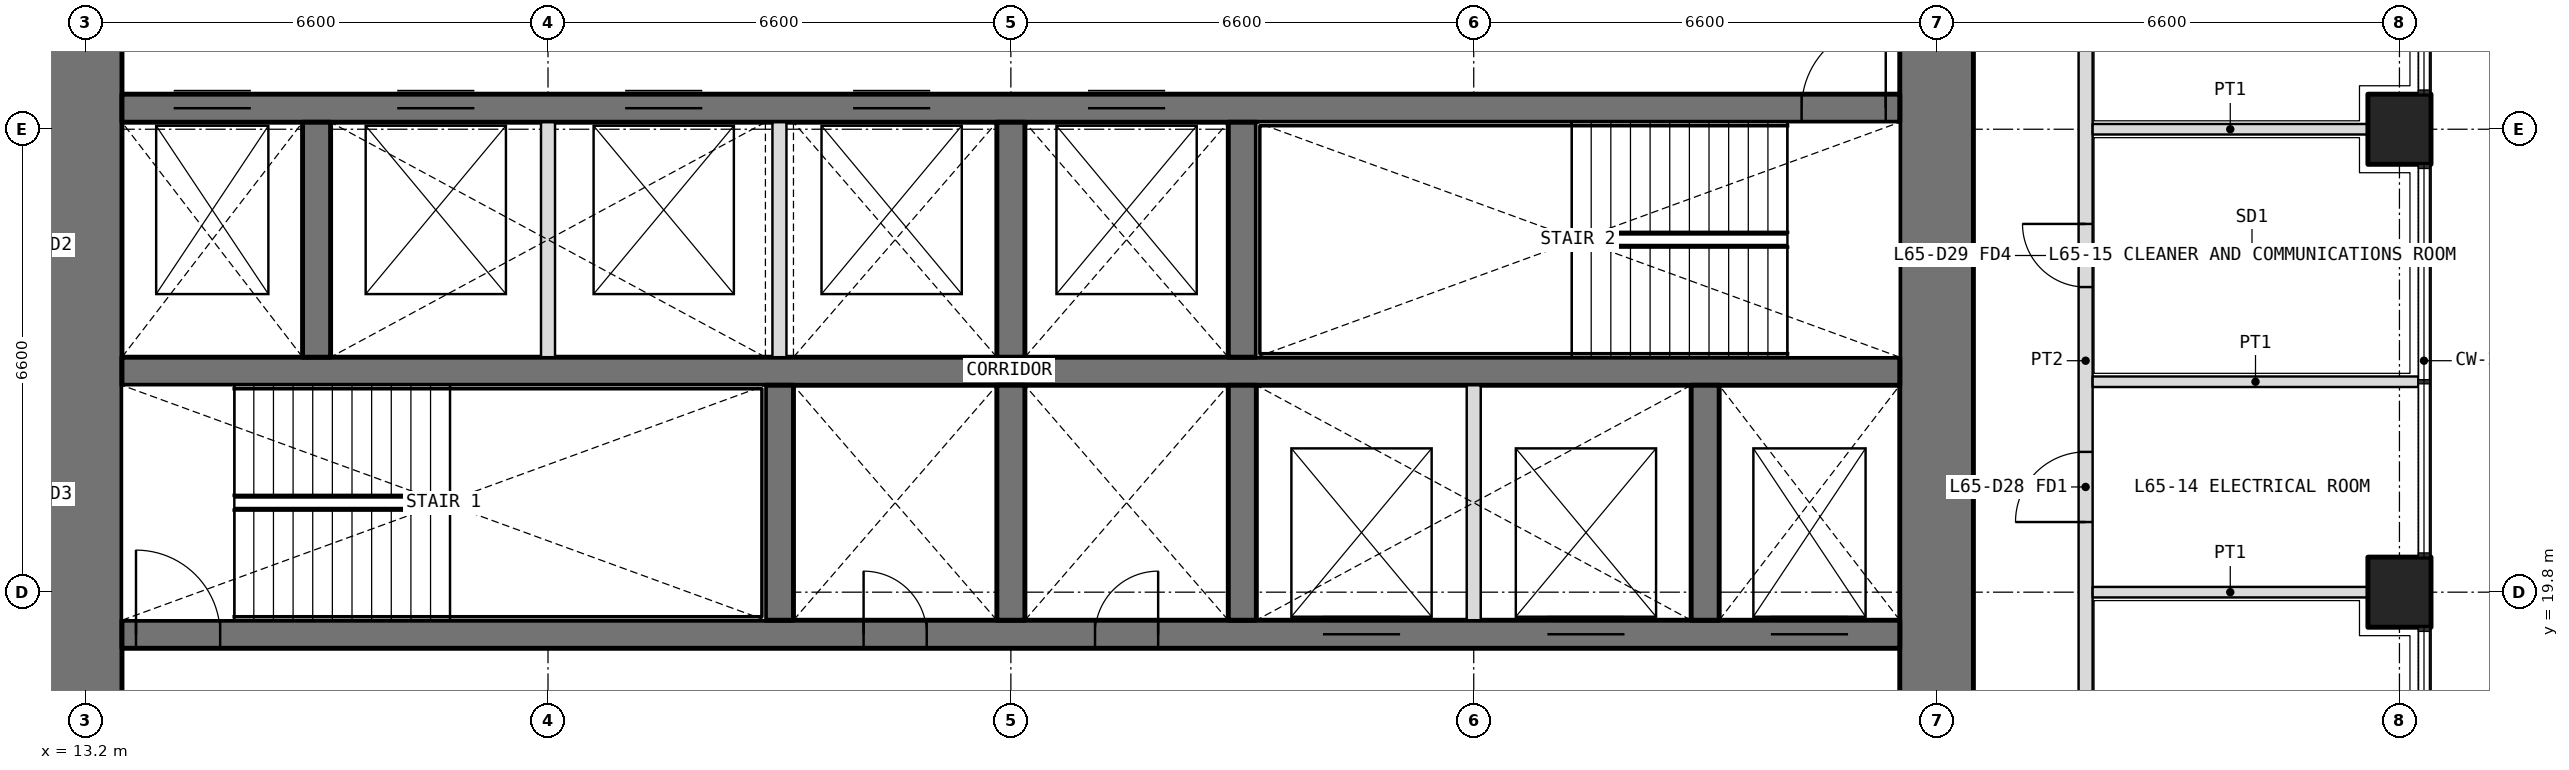
"""IFC4 building model, lengths in metres.
Left out: names, types, materials, properties, quantities, classifications, styles, units other than length and angle.
Written with IfcOpenShell. Run it as: python <this file> out.ifc"""

import sys

from ifc_helpers import new_model, si_unit, direction, frame, frame_2d, origin, origin_2d, place, context, subcontext, project, spatial, rectangle, extrude, element, fill, save


model = new_model("IFC4")
c1 = context("Model", 3, precision=1e-05, world=origin(), true_north=direction((0.0, 1.0)))
c2 = subcontext(c1, "Body", "Model", "MODEL_VIEW")
j1 = project(units=[si_unit("LENGTHUNIT", "METRE"), si_unit("PLANEANGLEUNIT", "RADIAN")], contexts=[c1])
p1 = place(None, origin())
s1 = spatial("IfcSite", under=j1, at=p1, CompositionType="ELEMENT")
p2 = place(p1, origin())
s2 = spatial("IfcBuilding", under=s1, at=p2, CompositionType="ELEMENT")
p3 = place(p2, frame((0.0, 0.0, 283.8)))
s3 = spatial("IfcBuildingStorey", under=s2, at=p3, CompositionType="ELEMENT", Elevation=283.8)
for number, where, z_axis, x_axis in (
    (1, (46.2, 19.8, 0.0), (0.0, 0.0, 1.0), (0.0, 1.0, 0.0)),
    (2, (46.2, 26.4, 0.0), (0.0, 0.0, 1.0), (0.0, 1.0, 0.0)),
):
    element("IfcColumn", number, at=place(p3, frame(where, z_axis=z_axis, x_axis=x_axis)), inside=s3, PredefinedType="COLUMN", context=c2, shape_type="SweptSolid", body=[
        extrude(rectangle(XDim=1.0, YDim=0.9, at=origin_2d()), origin(), (0.0, 0.0, 1.0), 4.2),
    ])
p4 = place(p3, frame((39.6, 13.725, 0.0), z_axis=(0.0, 0.0, 1.0), x_axis=(0.0, 1.0, 0.0)))
e3 = element("IfcWall", 3, at=p4, inside=s3, PredefinedType="SHEAR", context=c2, shape_type="SweptSolid", body=[
    extrude(rectangle(XDim=18.75, YDim=1.05, at=frame_2d((9.375, 0.0))), origin(), (0.0, 0.0, 1.0), 4.2),
])
p5 = place(p4, frame((3.025, 0.0, 0.0)))
e4 = element("IfcOpeningElement", 4, at=p5, cuts=e3, PredefinedType="OPENING", context=c2, shape_type="SweptSolid", body=[
    extrude(rectangle(XDim=1.6, YDim=2.1, at=frame_2d((0.8, 1.05))), frame((0.0, 0.535, 0.0), z_axis=(0.0, -1.0, 0.0), x_axis=(1.0, 0.0, 0.0)), (0.0, 0.0, 1.0), 1.07),
])
p6 = place(p4, frame((13.825, 0.0, 0.0)))
e5 = element("IfcOpeningElement", 5, at=p6, cuts=e3, PredefinedType="OPENING", context=c2, shape_type="SweptSolid", body=[
    extrude(rectangle(XDim=1.6, YDim=2.1, at=frame_2d((0.8, 1.05))), frame((0.0, 0.535, 0.0), z_axis=(0.0, -1.0, 0.0), x_axis=(1.0, 0.0, 0.0)), (0.0, 0.0, 1.0), 1.07),
])
p7 = place(p3, frame((13.2, 32.475, 0.0), z_axis=(0.0, 0.0, 1.0), x_axis=(0.0, -1.0, 0.0)))
e6 = element("IfcWall", 6, at=p7, inside=s3, PredefinedType="SHEAR", context=c2, shape_type="SweptSolid", body=[
    extrude(rectangle(XDim=18.75, YDim=1.05, at=frame_2d((9.375, 0.0))), origin(), (0.0, 0.0, 1.0), 4.2),
])
p8 = place(p7, frame((14.125, 0.0, 0.0)))
e7 = element("IfcOpeningElement", 7, at=p8, cuts=e6, PredefinedType="OPENING", context=c2, shape_type="SweptSolid", body=[
    extrude(rectangle(XDim=1.6, YDim=2.1, at=frame_2d((0.8, 1.05))), frame((0.0, 0.535, 0.0), z_axis=(0.0, -1.0, 0.0), x_axis=(1.0, 0.0, 0.0)), (0.0, 0.0, 1.0), 1.07),
])
p9 = place(p7, frame((3.325, 0.0, 0.0)))
e8 = element("IfcOpeningElement", 8, at=p9, cuts=e6, PredefinedType="OPENING", context=c2, shape_type="SweptSolid", body=[
    extrude(rectangle(XDim=1.6, YDim=2.1, at=frame_2d((0.8, 1.05))), frame((0.0, 0.535, 0.0), z_axis=(0.0, -1.0, 0.0), x_axis=(1.0, 0.0, 0.0)), (0.0, 0.0, 1.0), 1.07),
])
p10 = place(p3, frame((13.725, 19.2, 0.0), z_axis=(0.0, 0.0, 1.0), x_axis=(1.0, 0.0, 0.0)))
e9 = element("IfcWall", 9, at=p10, inside=s3, PredefinedType="SHEAR", context=c2, shape_type="SweptSolid", body=[
    extrude(rectangle(XDim=25.35, YDim=0.4, at=frame_2d((12.675, 0.0))), origin(), (0.0, 0.0, 1.0), 4.2),
])
p11 = place(p10, frame((10.575, 0.0, 0.0)))
e10 = element("IfcOpeningElement", 10, at=p11, cuts=e9, PredefinedType="OPENING", context=c2, shape_type="SweptSolid", body=[
    extrude(rectangle(XDim=0.9, YDim=2.1, at=frame_2d((0.45, 1.05))), frame((0.0, 0.21, 0.0), z_axis=(0.0, -1.0, 0.0), x_axis=(1.0, 0.0, 0.0)), (0.0, 0.0, 1.0), 0.42),
])
p12 = place(p10, frame((13.875, 0.0, 0.0)))
e11 = element("IfcOpeningElement", 11, at=p12, cuts=e9, PredefinedType="OPENING", context=c2, shape_type="SweptSolid", body=[
    extrude(rectangle(XDim=0.9, YDim=2.1, at=frame_2d((0.45, 1.05))), frame((0.0, 0.21, 0.0), z_axis=(0.0, -1.0, 0.0), x_axis=(1.0, 0.0, 0.0)), (0.0, 0.0, 1.0), 0.42),
])
p13 = place(p10, frame((0.2, 0.0, 0.0)))
e12 = element("IfcOpeningElement", 12, at=p13, cuts=e9, PredefinedType="OPENING", context=c2, shape_type="SweptSolid", body=[
    extrude(rectangle(XDim=1.2, YDim=2.1, at=frame_2d((0.6, 1.05))), frame((0.0, 0.21, 0.0), z_axis=(0.0, -1.0, 0.0), x_axis=(1.0, 0.0, 0.0)), (0.0, 0.0, 1.0), 0.42),
])
p14 = place(p10, frame((23.512, 0.0, 0.0)))
e13 = element("IfcOpeningElement", 13, at=p14, cuts=e9, PredefinedType="OPENING", context=c2, shape_type="SweptSolid", body=[
    extrude(rectangle(XDim=1.1, YDim=2.1, at=frame_2d((0.55, 1.05))), frame((0.0, 0.21, 0.0), z_axis=(0.0, -1.0, 0.0), x_axis=(1.0, 0.0, 0.0)), (0.0, 0.0, 1.0), 0.42),
])
p15 = place(p10, frame((17.125, 0.0, 0.0)))
e14 = element("IfcOpeningElement", 14, at=p15, cuts=e9, PredefinedType="OPENING", context=c2, shape_type="SweptSolid", body=[
    extrude(rectangle(XDim=1.1, YDim=2.1, at=frame_2d((0.55, 1.05))), frame((0.0, 0.21, 0.0), z_axis=(0.0, -1.0, 0.0), x_axis=(1.0, 0.0, 0.0)), (0.0, 0.0, 1.0), 0.42),
])
p16 = place(p10, frame((20.325, 0.0, 0.0)))
e15 = element("IfcOpeningElement", 15, at=p16, cuts=e9, PredefinedType="OPENING", context=c2, shape_type="SweptSolid", body=[
    extrude(rectangle(XDim=1.1, YDim=2.1, at=frame_2d((0.55, 1.05))), frame((0.0, 0.21, 0.0), z_axis=(0.0, -1.0, 0.0), x_axis=(1.0, 0.0, 0.0)), (0.0, 0.0, 1.0), 0.42),
])
p17 = place(p3, frame((13.725, 22.95, 0.0), z_axis=(0.0, 0.0, 1.0), x_axis=(1.0, 0.0, 0.0)))
e16 = element("IfcWall", 16, at=p17, inside=s3, PredefinedType="SHEAR", context=c2, shape_type="SweptSolid", body=[
    extrude(rectangle(XDim=25.35, YDim=0.4, at=frame_2d((12.675, 0.0))), origin(), (0.0, 0.0, 1.0), 4.2),
])
p18 = place(p3, frame((13.725, 26.7, 0.0), z_axis=(0.0, 0.0, 1.0), x_axis=(1.0, 0.0, 0.0)))
e17 = element("IfcWall", 17, at=p18, inside=s3, PredefinedType="SHEAR", context=c2, shape_type="SweptSolid", body=[
    extrude(rectangle(XDim=25.35, YDim=0.4, at=frame_2d((12.675, 0.0))), origin(), (0.0, 0.0, 1.0), 4.2),
])
p19 = place(p18, frame((23.95, 0.0, 0.0)))
e18 = element("IfcOpeningElement", 18, at=p19, cuts=e17, PredefinedType="OPENING", context=c2, shape_type="SweptSolid", body=[
    extrude(rectangle(XDim=1.2, YDim=2.1, at=frame_2d((0.6, 1.05))), frame((0.0, 0.21, 0.0), z_axis=(0.0, -1.0, 0.0), x_axis=(1.0, 0.0, 0.0)), (0.0, 0.0, 1.0), 0.42),
])
p20 = place(p18, frame((0.738, 0.0, 0.0)))
e19 = element("IfcOpeningElement", 19, at=p20, cuts=e17, PredefinedType="OPENING", context=c2, shape_type="SweptSolid", body=[
    extrude(rectangle(XDim=1.1, YDim=2.1, at=frame_2d((0.55, 1.05))), frame((0.0, 0.21, 0.0), z_axis=(0.0, -1.0, 0.0), x_axis=(1.0, 0.0, 0.0)), (0.0, 0.0, 1.0), 0.42),
])
p21 = place(p18, frame((3.925, 0.0, 0.0)))
e20 = element("IfcOpeningElement", 20, at=p21, cuts=e17, PredefinedType="OPENING", context=c2, shape_type="SweptSolid", body=[
    extrude(rectangle(XDim=1.1, YDim=2.1, at=frame_2d((0.55, 1.05))), frame((0.0, 0.21, 0.0), z_axis=(0.0, -1.0, 0.0), x_axis=(1.0, 0.0, 0.0)), (0.0, 0.0, 1.0), 0.42),
])
p22 = place(p18, frame((7.175, 0.0, 0.0)))
e21 = element("IfcOpeningElement", 21, at=p22, cuts=e17, PredefinedType="OPENING", context=c2, shape_type="SweptSolid", body=[
    extrude(rectangle(XDim=1.1, YDim=2.1, at=frame_2d((0.55, 1.05))), frame((0.0, 0.21, 0.0), z_axis=(0.0, -1.0, 0.0), x_axis=(1.0, 0.0, 0.0)), (0.0, 0.0, 1.0), 0.42),
])
p23 = place(p18, frame((10.425, 0.0, 0.0)))
e22 = element("IfcOpeningElement", 22, at=p23, cuts=e17, PredefinedType="OPENING", context=c2, shape_type="SweptSolid", body=[
    extrude(rectangle(XDim=1.1, YDim=2.1, at=frame_2d((0.55, 1.05))), frame((0.0, 0.21, 0.0), z_axis=(0.0, -1.0, 0.0), x_axis=(1.0, 0.0, 0.0)), (0.0, 0.0, 1.0), 0.42),
])
p24 = place(p18, frame((13.775, 0.0, 0.0)))
e23 = element("IfcOpeningElement", 23, at=p24, cuts=e17, PredefinedType="OPENING", context=c2, shape_type="SweptSolid", body=[
    extrude(rectangle(XDim=1.1, YDim=2.1, at=frame_2d((0.55, 1.05))), frame((0.0, 0.21, 0.0), z_axis=(0.0, -1.0, 0.0), x_axis=(1.0, 0.0, 0.0)), (0.0, 0.0, 1.0), 0.42),
])
for number, where, z_axis, x_axis in (
    (24, (23.1, 19.4, 0.0), (0.0, 0.0, 1.0), (0.0, 1.0, 0.0)),
    (25, (26.4, 19.4, 0.0), (0.0, 0.0, 1.0), (0.0, 1.0, 0.0)),
    (26, (29.7, 19.4, 0.0), (0.0, 0.0, 1.0), (0.0, 1.0, 0.0)),
    (27, (36.3, 19.4, 0.0), (0.0, 0.0, 1.0), (0.0, 1.0, 0.0)),
    (28, (16.5, 23.15, 0.0), (0.0, 0.0, 1.0), (0.0, 1.0, 0.0)),
    (29, (26.4, 23.15, 0.0), (0.0, 0.0, 1.0), (0.0, 1.0, 0.0)),
    (30, (29.7, 23.15, 0.0), (0.0, 0.0, 1.0), (0.0, 1.0, 0.0)),
):
    element("IfcWall", number, at=place(p3, frame(where, z_axis=z_axis, x_axis=x_axis)), inside=s3, PredefinedType="SHEAR", context=c2, shape_type="SweptSolid", body=[
        extrude(rectangle(XDim=3.35, YDim=0.4, at=frame_2d((1.675, 0.0))), origin(), (0.0, 0.0, 1.0), 4.2),
    ])
for number, where, z_axis, x_axis in (
    (31, (33.0, 19.4, 0.0), (0.0, 0.0, 1.0), (0.0, 1.0, 0.0)),
    (32, (19.8, 23.15, 0.0), (0.0, 0.0, 1.0), (0.0, 1.0, 0.0)),
    (33, (23.1, 23.15, 0.0), (0.0, 0.0, 1.0), (0.0, 1.0, 0.0)),
):
    element("IfcWall", number, at=place(p3, frame(where, z_axis=z_axis, x_axis=x_axis)), inside=s3, PredefinedType="PARTITIONING", context=c2, shape_type="SweptSolid", body=[
        extrude(rectangle(XDim=3.35, YDim=0.2, at=frame_2d((1.675, 0.0))), origin(), (0.0, 0.0, 1.0), 4.2),
    ])
p25 = place(p3, frame((41.725, 7.4, 0.0), z_axis=(0.0, 0.0, 1.0), x_axis=(0.0, 1.0, 0.0)))
e34 = element("IfcWall", 34, at=p25, inside=s3, PredefinedType="PARTITIONING", context=c2, shape_type="SweptSolid", body=[
    extrude(rectangle(XDim=31.4, YDim=0.2, at=frame_2d((15.7, 0.0))), origin(), (0.0, 0.0, 1.0), 3.0),
])
p26 = place(p25, frame((5.65, 0.0, 0.0)))
e35 = element("IfcOpeningElement", 35, at=p26, cuts=e34, PredefinedType="OPENING", context=c2, shape_type="SweptSolid", body=[
    extrude(rectangle(XDim=1.0, YDim=2.1, at=frame_2d((0.5, 1.05))), frame((0.0, 0.11, 0.0), z_axis=(0.0, -1.0, 0.0), x_axis=(1.0, 0.0, 0.0)), (0.0, 0.0, 1.0), 0.22),
])
p27 = place(p25, frame((13.4, 0.0, 0.0)))
e36 = element("IfcOpeningElement", 36, at=p27, cuts=e34, PredefinedType="OPENING", context=c2, shape_type="SweptSolid", body=[
    extrude(rectangle(XDim=1.0, YDim=2.1, at=frame_2d((0.5, 1.05))), frame((0.0, 0.11, 0.0), z_axis=(0.0, -1.0, 0.0), x_axis=(1.0, 0.0, 0.0)), (0.0, 0.0, 1.0), 0.22),
])
p28 = place(p25, frame((16.75, 0.0, 0.0)))
e37 = element("IfcOpeningElement", 37, at=p28, cuts=e34, PredefinedType="OPENING", context=c2, shape_type="SweptSolid", body=[
    extrude(rectangle(XDim=0.9, YDim=2.1, at=frame_2d((0.45, 1.05))), frame((0.0, 0.11, 0.0), z_axis=(0.0, -1.0, 0.0), x_axis=(1.0, 0.0, 0.0)), (0.0, 0.0, 1.0), 0.22),
])
p29 = place(p25, frame((24.75, 0.0, 0.0)))
e38 = element("IfcOpeningElement", 38, at=p29, cuts=e34, PredefinedType="OPENING", context=c2, shape_type="SweptSolid", body=[
    extrude(rectangle(XDim=1.0, YDim=2.1, at=frame_2d((0.5, 1.05))), frame((0.0, 0.11, 0.0), z_axis=(0.0, -1.0, 0.0), x_axis=(1.0, 0.0, 0.0)), (0.0, 0.0, 1.0), 0.22),
])
p30 = place(p3, frame((46.47, 22.8, 0.0), z_axis=(0.0, 0.0, 1.0), x_axis=(-1.0, 0.0, 0.0)))
e39 = element("IfcWall", 39, at=p30, inside=s3, PredefinedType="PARTITIONING", context=c2, shape_type="SweptSolid", body=[
    extrude(rectangle(XDim=4.645, YDim=0.15, at=frame_2d((2.323, 0.0))), origin(), (0.0, 0.0, 1.0), 2.7),
])
for number, where, z_axis, x_axis in (
    (40, (45.75, 26.4, 0.0), (0.0, 0.0, 1.0), (-1.0, 0.0, 0.0)),
    (41, (45.75, 19.8, 0.0), (0.0, 0.0, 1.0), (-1.0, 0.0, 0.0)),
):
    element("IfcWall", number, at=place(p3, frame(where, z_axis=z_axis, x_axis=x_axis)), inside=s3, PredefinedType="PARTITIONING", context=c2, shape_type="SweptSolid", body=[
        extrude(rectangle(XDim=3.925, YDim=0.15, at=frame_2d((1.962, 0.0))), origin(), (0.0, 0.0, 1.0), 3.0),
    ])
p31 = place(p27, origin())
e42 = element("IfcDoor", 42, at=p31, inside=s3, OperationType="SINGLE_SWING_LEFT", PredefinedType="DOOR", context=c2, shape_type="SweptSolid", body=[
    extrude(rectangle(XDim=1.0, YDim=2.1, at=frame_2d((0.5, 1.05))), frame((0.0, 0.025, 0.0), z_axis=(0.0, -1.0, 0.0), x_axis=(1.0, 0.0, 0.0)), (0.0, 0.0, 1.0), 0.05),
])
fill(e36, e42)
p32 = place(p28, origin())
e43 = element("IfcDoor", 43, at=p32, inside=s3, OperationType="SINGLE_SWING_RIGHT", PredefinedType="DOOR", context=c2, shape_type="SweptSolid", body=[
    extrude(rectangle(XDim=0.9, YDim=2.1, at=frame_2d((0.45, 1.05))), frame((0.0, 0.025, 0.0), z_axis=(0.0, -1.0, 0.0), x_axis=(1.0, 0.0, 0.0)), (0.0, 0.0, 1.0), 0.05),
])
fill(e37, e43)
p33 = place(p11, origin())
e44 = element("IfcDoor", 44, at=p33, inside=s3, OperationType="SINGLE_SWING_LEFT", PredefinedType="DOOR", context=c2, shape_type="SweptSolid", body=[
    extrude(rectangle(XDim=0.9, YDim=2.1, at=frame_2d((0.45, 1.05))), frame((0.0, 0.025, 0.0), z_axis=(0.0, -1.0, 0.0), x_axis=(1.0, 0.0, 0.0)), (0.0, 0.0, 1.0), 0.05),
])
fill(e10, e44)
p34 = place(p12, origin())
e45 = element("IfcDoor", 45, at=p34, inside=s3, OperationType="SINGLE_SWING_RIGHT", PredefinedType="DOOR", context=c2, shape_type="SweptSolid", body=[
    extrude(rectangle(XDim=0.9, YDim=2.1, at=frame_2d((0.45, 1.05))), frame((0.0, 0.025, 0.0), z_axis=(0.0, -1.0, 0.0), x_axis=(1.0, 0.0, 0.0)), (0.0, 0.0, 1.0), 0.05),
])
fill(e11, e45)
p35 = place(p13, origin())
e46 = element("IfcDoor", 46, at=p35, inside=s3, OperationType="SINGLE_SWING_LEFT", PredefinedType="DOOR", context=c2, shape_type="SweptSolid", body=[
    extrude(rectangle(XDim=1.2, YDim=2.1, at=frame_2d((0.6, 1.05))), frame((0.0, 0.025, 0.0), z_axis=(0.0, -1.0, 0.0), x_axis=(1.0, 0.0, 0.0)), (0.0, 0.0, 1.0), 0.05),
])
fill(e12, e46)
p36 = place(p19, origin())
e47 = element("IfcDoor", 47, at=p36, inside=s3, OperationType="SINGLE_SWING_RIGHT", PredefinedType="DOOR", context=c2, shape_type="SweptSolid", body=[
    extrude(rectangle(XDim=1.2, YDim=2.1, at=frame_2d((0.6, 1.05))), frame((0.0, 0.025, 0.0), z_axis=(0.0, -1.0, 0.0), x_axis=(1.0, 0.0, 0.0)), (0.0, 0.0, 1.0), 0.05),
])
fill(e18, e47)
p37 = place(p20, origin())
e48 = element("IfcDoor", 48, at=p37, inside=s3, OperationType="DOUBLE_DOOR_SLIDING", PredefinedType="DOOR", context=c2, shape_type="SweptSolid", body=[
    extrude(rectangle(XDim=1.1, YDim=2.1, at=frame_2d((0.55, 1.05))), frame((0.0, 0.025, 0.0), z_axis=(0.0, -1.0, 0.0), x_axis=(1.0, 0.0, 0.0)), (0.0, 0.0, 1.0), 0.05),
])
fill(e19, e48)
p38 = place(p14, origin())
e49 = element("IfcDoor", 49, at=p38, inside=s3, OperationType="DOUBLE_DOOR_SLIDING", PredefinedType="DOOR", context=c2, shape_type="SweptSolid", body=[
    extrude(rectangle(XDim=1.1, YDim=2.1, at=frame_2d((0.55, 1.05))), frame((0.0, 0.025, 0.0), z_axis=(0.0, -1.0, 0.0), x_axis=(1.0, 0.0, 0.0)), (0.0, 0.0, 1.0), 0.05),
])
fill(e13, e49)
p39 = place(p15, origin())
e50 = element("IfcDoor", 50, at=p39, inside=s3, OperationType="DOUBLE_DOOR_SLIDING", PredefinedType="DOOR", context=c2, shape_type="SweptSolid", body=[
    extrude(rectangle(XDim=1.1, YDim=2.1, at=frame_2d((0.55, 1.05))), frame((0.0, 0.025, 0.0), z_axis=(0.0, -1.0, 0.0), x_axis=(1.0, 0.0, 0.0)), (0.0, 0.0, 1.0), 0.05),
])
fill(e14, e50)
p40 = place(p16, origin())
e51 = element("IfcDoor", 51, at=p40, inside=s3, OperationType="DOUBLE_DOOR_SLIDING", PredefinedType="DOOR", context=c2, shape_type="SweptSolid", body=[
    extrude(rectangle(XDim=1.1, YDim=2.1, at=frame_2d((0.55, 1.05))), frame((0.0, 0.025, 0.0), z_axis=(0.0, -1.0, 0.0), x_axis=(1.0, 0.0, 0.0)), (0.0, 0.0, 1.0), 0.05),
])
fill(e15, e51)
p41 = place(p21, origin())
e52 = element("IfcDoor", 52, at=p41, inside=s3, OperationType="DOUBLE_DOOR_SLIDING", PredefinedType="DOOR", context=c2, shape_type="SweptSolid", body=[
    extrude(rectangle(XDim=1.1, YDim=2.1, at=frame_2d((0.55, 1.05))), frame((0.0, 0.025, 0.0), z_axis=(0.0, -1.0, 0.0), x_axis=(1.0, 0.0, 0.0)), (0.0, 0.0, 1.0), 0.05),
])
fill(e20, e52)
p42 = place(p22, origin())
e53 = element("IfcDoor", 53, at=p42, inside=s3, OperationType="DOUBLE_DOOR_SLIDING", PredefinedType="DOOR", context=c2, shape_type="SweptSolid", body=[
    extrude(rectangle(XDim=1.1, YDim=2.1, at=frame_2d((0.55, 1.05))), frame((0.0, 0.025, 0.0), z_axis=(0.0, -1.0, 0.0), x_axis=(1.0, 0.0, 0.0)), (0.0, 0.0, 1.0), 0.05),
])
fill(e21, e53)
p43 = place(p23, origin())
e54 = element("IfcDoor", 54, at=p43, inside=s3, OperationType="DOUBLE_DOOR_SLIDING", PredefinedType="DOOR", context=c2, shape_type="SweptSolid", body=[
    extrude(rectangle(XDim=1.1, YDim=2.1, at=frame_2d((0.55, 1.05))), frame((0.0, 0.025, 0.0), z_axis=(0.0, -1.0, 0.0), x_axis=(1.0, 0.0, 0.0)), (0.0, 0.0, 1.0), 0.05),
])
fill(e22, e54)
p44 = place(p24, origin())
e55 = element("IfcDoor", 55, at=p44, inside=s3, OperationType="DOUBLE_DOOR_SLIDING", PredefinedType="DOOR", context=c2, shape_type="SweptSolid", body=[
    extrude(rectangle(XDim=1.1, YDim=2.1, at=frame_2d((0.55, 1.05))), frame((0.0, 0.025, 0.0), z_axis=(0.0, -1.0, 0.0), x_axis=(1.0, 0.0, 0.0)), (0.0, 0.0, 1.0), 0.05),
])
fill(e23, e55)
save(model, sys.argv[1])
